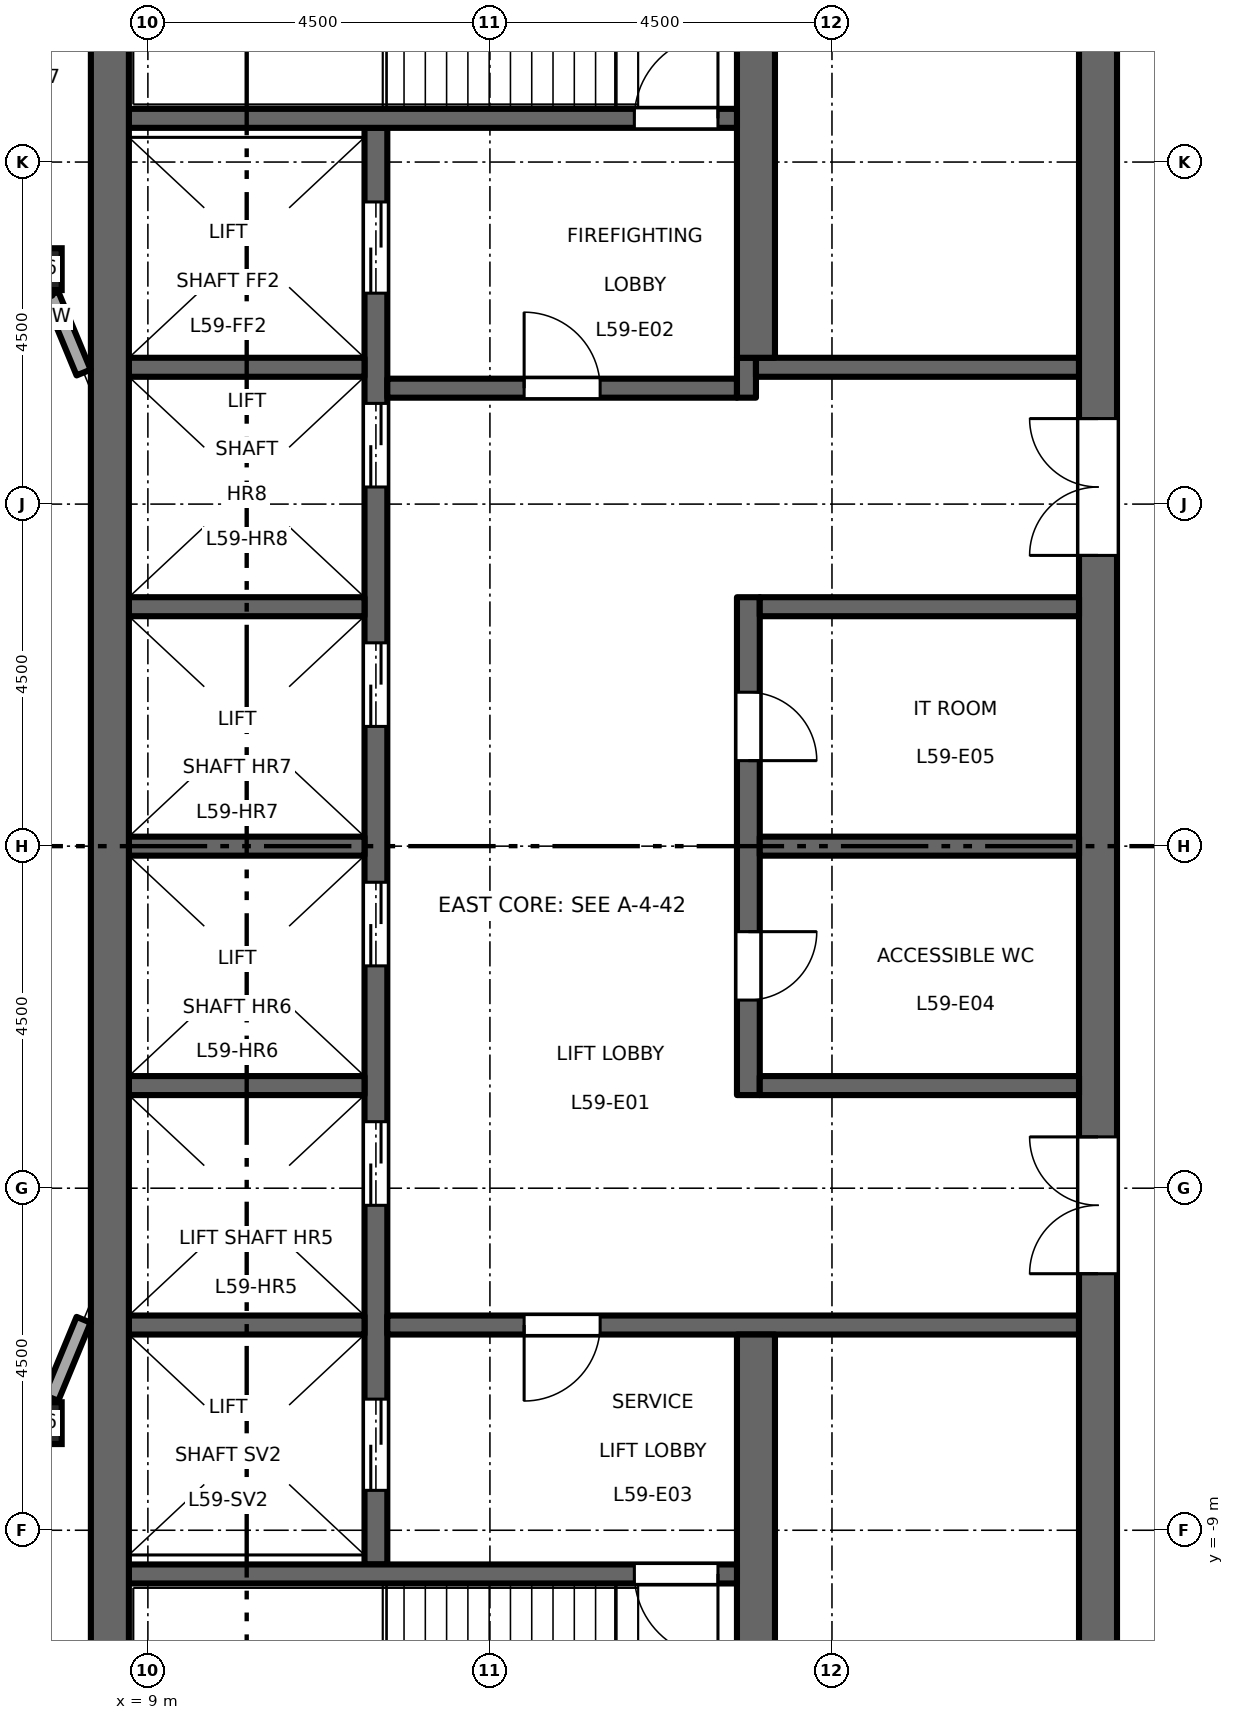
"""IFC4 building model, lengths in metres.
Left out: names, types, materials, properties, quantities, classifications, styles, units other than length and angle.
Written with IfcOpenShell. Run it as: python <this file> out.ifc"""

import sys

from ifc_helpers import new_model, si_unit, direction, frame, frame_2d, origin, origin_2d, place, context, subcontext, project, spatial, rectangle, hollow_rectangle, extrude, element, fill, save


model = new_model("IFC4")
c1 = context("Model", 3, precision=1e-05, world=origin(), true_north=direction((0.0, 1.0)))
c2 = subcontext(c1, "Body", "Model", "MODEL_VIEW")
j1 = project(units=[si_unit("LENGTHUNIT", "METRE"), si_unit("PLANEANGLEUNIT", "RADIAN")], contexts=[c1])
p1 = place(None, origin())
s1 = spatial("IfcSite", under=j1, at=p1, CompositionType="ELEMENT")
p2 = place(p1, origin())
s2 = spatial("IfcBuilding", under=s1, at=p2, CompositionType="ELEMENT")
p3 = place(p2, frame((0.0, 0.0, 273.7)))
s3 = spatial("IfcBuildingStorey", under=s2, at=p3, CompositionType="ELEMENT", Elevation=273.7)
for number, where, z_axis, x_axis in (
    (1, (7.591, -7.591, 0.0), (0.0, 0.0, 1.0), (1.0, 0.0, 0.0)),
    (2, (7.591, 7.591, 0.0), (0.0, 0.0, 1.0), (1.0, 0.0, 0.0)),
):
    element("IfcColumn", number, at=place(p3, frame(where, z_axis=z_axis, x_axis=x_axis)), inside=s3, PredefinedType="COLUMN", context=c2, shape_type="SweptSolid", body=[
        extrude(hollow_rectangle(XDim=0.55, YDim=0.55, WallThickness=0.028, at=origin_2d()), origin(), (0.0, 0.0, 1.0), 4.5),
    ])
p4 = place(p3, frame((12.0, -9.45, 0.0), z_axis=(0.0, 0.0, 1.0), x_axis=(0.0, 1.0, 0.0)))
e3 = element("IfcWall", 3, at=p4, inside=s3, PredefinedType="SHEAR", context=c2, shape_type="SweptSolid", body=[
    extrude(rectangle(XDim=18.9, YDim=0.3, at=frame_2d((9.45, 0.0))), origin(), (0.0, 0.0, 1.0), 4.3),
])
p5 = place(p4, frame((4.725, 0.0, 0.0)))
e4 = element("IfcOpeningElement", 4, at=p5, cuts=e3, PredefinedType="OPENING", context=c2, shape_type="SweptSolid", body=[
    extrude(rectangle(XDim=1.1, YDim=2.1, at=frame_2d((0.55, 1.05))), frame((0.0, 0.16, 0.0), z_axis=(0.0, -1.0, 0.0), x_axis=(1.0, 0.0, 0.0)), (0.0, 0.0, 1.0), 0.32),
])
p6 = place(p4, frame((7.875, 0.0, 0.0)))
e5 = element("IfcOpeningElement", 5, at=p6, cuts=e3, PredefinedType="OPENING", context=c2, shape_type="SweptSolid", body=[
    extrude(rectangle(XDim=1.1, YDim=2.1, at=frame_2d((0.55, 1.05))), frame((0.0, 0.16, 0.0), z_axis=(0.0, -1.0, 0.0), x_axis=(1.0, 0.0, 0.0)), (0.0, 0.0, 1.0), 0.32),
])
p7 = place(p4, frame((11.025, 0.0, 0.0)))
e6 = element("IfcOpeningElement", 6, at=p7, cuts=e3, PredefinedType="OPENING", context=c2, shape_type="SweptSolid", body=[
    extrude(rectangle(XDim=1.1, YDim=2.1, at=frame_2d((0.55, 1.05))), frame((0.0, 0.16, 0.0), z_axis=(0.0, -1.0, 0.0), x_axis=(1.0, 0.0, 0.0)), (0.0, 0.0, 1.0), 0.32),
])
p8 = place(p4, frame((14.175, 0.0, 0.0)))
e7 = element("IfcOpeningElement", 7, at=p8, cuts=e3, PredefinedType="OPENING", context=c2, shape_type="SweptSolid", body=[
    extrude(rectangle(XDim=1.1, YDim=2.1, at=frame_2d((0.55, 1.05))), frame((0.0, 0.16, 0.0), z_axis=(0.0, -1.0, 0.0), x_axis=(1.0, 0.0, 0.0)), (0.0, 0.0, 1.0), 0.32),
])
p9 = place(p4, frame((16.725, 0.0, 0.0)))
e8 = element("IfcOpeningElement", 8, at=p9, cuts=e3, PredefinedType="OPENING", context=c2, shape_type="SweptSolid", body=[
    extrude(rectangle(XDim=1.2, YDim=2.1, at=frame_2d((0.6, 1.05))), frame((0.0, 0.16, 0.0), z_axis=(0.0, -1.0, 0.0), x_axis=(1.0, 0.0, 0.0)), (0.0, 0.0, 1.0), 0.32),
])
p10 = place(p4, frame((0.975, 0.0, 0.0)))
e9 = element("IfcOpeningElement", 9, at=p10, cuts=e3, PredefinedType="OPENING", context=c2, shape_type="SweptSolid", body=[
    extrude(rectangle(XDim=1.2, YDim=2.1, at=frame_2d((0.6, 1.05))), frame((0.0, 0.16, 0.0), z_axis=(0.0, -1.0, 0.0), x_axis=(1.0, 0.0, 0.0)), (0.0, 0.0, 1.0), 0.32),
])
p11 = place(p3, frame((12.15, 6.025, 0.0), z_axis=(0.0, 0.0, 1.0), x_axis=(1.0, 0.0, 0.0)))
e10 = element("IfcWall", 10, at=p11, inside=s3, PredefinedType="SHEAR", context=c2, shape_type="SweptSolid", body=[
    extrude(rectangle(XDim=4.6, YDim=0.25, at=frame_2d((2.3, 0.0))), origin(), (0.0, 0.0, 1.0), 4.3),
])
p12 = place(p11, frame((1.8, 0.0, 0.0)))
e11 = element("IfcOpeningElement", 11, at=p12, cuts=e10, PredefinedType="OPENING", context=c2, shape_type="SweptSolid", body=[
    extrude(rectangle(XDim=1.0, YDim=2.1, at=frame_2d((0.5, 1.05))), frame((0.0, 0.135, 0.0), z_axis=(0.0, -1.0, 0.0), x_axis=(1.0, 0.0, 0.0)), (0.0, 0.0, 1.0), 0.27),
])
p13 = place(p3, frame((16.875, 5.9, 0.0), z_axis=(0.0, 0.0, 1.0), x_axis=(0.0, 1.0, 0.0)))
e12 = element("IfcWall", 12, at=p13, inside=s3, PredefinedType="SHEAR", context=c2, shape_type="SweptSolid", body=[
    extrude(rectangle(XDim=0.525, YDim=0.25, at=frame_2d((0.263, 0.0))), origin(), (0.0, 0.0, 1.0), 4.3),
])
p14 = place(p3, frame((17.0, 6.3, 0.0), z_axis=(0.0, 0.0, 1.0), x_axis=(1.0, 0.0, 0.0)))
e13 = element("IfcWall", 13, at=p14, inside=s3, PredefinedType="SHEAR", context=c2, shape_type="SweptSolid", body=[
    extrude(rectangle(XDim=4.25, YDim=0.25, at=frame_2d((2.125, 0.0))), origin(), (0.0, 0.0, 1.0), 4.3),
])
p15 = place(p3, frame((12.15, -6.3, 0.0), z_axis=(0.0, 0.0, 1.0), x_axis=(1.0, 0.0, 0.0)))
e14 = element("IfcWall", 14, at=p15, inside=s3, PredefinedType="SHEAR", context=c2, shape_type="SweptSolid", body=[
    extrude(rectangle(XDim=9.1, YDim=0.25, at=frame_2d((4.55, 0.0))), origin(), (0.0, 0.0, 1.0), 4.3),
])
p16 = place(p15, frame((1.8, 0.0, 0.0)))
e15 = element("IfcOpeningElement", 15, at=p16, cuts=e14, PredefinedType="OPENING", context=c2, shape_type="SweptSolid", body=[
    extrude(rectangle(XDim=1.0, YDim=2.1, at=frame_2d((0.5, 1.05))), frame((0.0, 0.135, 0.0), z_axis=(0.0, -1.0, 0.0), x_axis=(1.0, 0.0, 0.0)), (0.0, 0.0, 1.0), 0.27),
])
p17 = place(p3, frame((21.5, -13.0, 0.0), z_axis=(0.0, 0.0, 1.0), x_axis=(0.0, 1.0, 0.0)))
e16 = element("IfcWall", 16, at=p17, inside=s3, PredefinedType="SHEAR", context=c2, shape_type="SweptSolid", body=[
    extrude(rectangle(XDim=26.0, YDim=0.5, at=frame_2d((13.0, 0.0))), origin(), (0.0, 0.0, 1.0), 4.3),
])
p18 = place(p17, frame((16.825, 0.0, 0.0)))
e17 = element("IfcOpeningElement", 17, at=p18, cuts=e16, PredefinedType="OPENING", context=c2, shape_type="SweptSolid", body=[
    extrude(rectangle(XDim=1.8, YDim=2.1, at=frame_2d((0.9, 1.05))), frame((0.0, 0.26, 0.0), z_axis=(0.0, -1.0, 0.0), x_axis=(1.0, 0.0, 0.0)), (0.0, 0.0, 1.0), 0.52),
])
p19 = place(p17, frame((7.375, 0.0, 0.0)))
e18 = element("IfcOpeningElement", 18, at=p19, cuts=e16, PredefinedType="OPENING", context=c2, shape_type="SweptSolid", body=[
    extrude(rectangle(XDim=1.8, YDim=2.1, at=frame_2d((0.9, 1.05))), frame((0.0, 0.26, 0.0), z_axis=(0.0, -1.0, 0.0), x_axis=(1.0, 0.0, 0.0)), (0.0, 0.0, 1.0), 0.52),
])
p20 = place(p3, frame((16.9, -3.275, 0.0), z_axis=(0.0, 0.0, 1.0), x_axis=(0.0, 1.0, 0.0)))
e19 = element("IfcWall", 19, at=p20, inside=s3, PredefinedType="SHEAR", context=c2, shape_type="SweptSolid", body=[
    extrude(rectangle(XDim=6.55, YDim=0.3, at=frame_2d((3.275, 0.0))), origin(), (0.0, 0.0, 1.0), 4.3),
])
p21 = place(p20, frame((1.25, 0.0, 0.0)))
e20 = element("IfcOpeningElement", 20, at=p21, cuts=e19, PredefinedType="OPENING", context=c2, shape_type="SweptSolid", body=[
    extrude(rectangle(XDim=0.9, YDim=2.1, at=frame_2d((0.45, 1.05))), frame((0.0, 0.16, 0.0), z_axis=(0.0, -1.0, 0.0), x_axis=(1.0, 0.0, 0.0)), (0.0, 0.0, 1.0), 0.32),
])
p22 = place(p20, frame((4.4, 0.0, 0.0)))
e21 = element("IfcOpeningElement", 21, at=p22, cuts=e19, PredefinedType="OPENING", context=c2, shape_type="SweptSolid", body=[
    extrude(rectangle(XDim=0.9, YDim=2.1, at=frame_2d((0.45, 1.05))), frame((0.0, 0.16, 0.0), z_axis=(0.0, -1.0, 0.0), x_axis=(1.0, 0.0, 0.0)), (0.0, 0.0, 1.0), 0.32),
])
for number, where, z_axis, x_axis in (
    (22, (17.05, 0.0, 0.0), (0.0, 0.0, 1.0), (1.0, 0.0, 0.0)),
    (23, (17.05, 3.15, 0.0), (0.0, 0.0, 1.0), (1.0, 0.0, 0.0)),
    (24, (17.05, -3.15, 0.0), (0.0, 0.0, 1.0), (1.0, 0.0, 0.0)),
):
    element("IfcWall", number, at=place(p3, frame(where, z_axis=z_axis, x_axis=x_axis)), inside=s3, PredefinedType="SHEAR", context=c2, shape_type="SweptSolid", body=[
        extrude(rectangle(XDim=4.2, YDim=0.25, at=frame_2d((2.1, 0.0))), origin(), (0.0, 0.0, 1.0), 4.3),
    ])
for number, where, z_axis, x_axis in (
    (25, (17.0, 6.425, 0.0), (0.0, 0.0, 1.0), (0.0, 1.0, 0.0)),
    (26, (17.0, -13.0, 0.0), (0.0, 0.0, 1.0), (0.0, 1.0, 0.0)),
):
    element("IfcWall", number, at=place(p3, frame(where, z_axis=z_axis, x_axis=x_axis)), inside=s3, PredefinedType="SHEAR", context=c2, shape_type="SweptSolid", body=[
        extrude(rectangle(XDim=6.575, YDim=0.5, at=frame_2d((3.288, 0.0))), origin(), (0.0, 0.0, 1.0), 4.3),
    ])
for number, where, z_axis, x_axis in (
    (27, (8.75, 0.0, 0.0), (0.0, 0.0, 1.0), (1.0, 0.0, 0.0)),
    (28, (8.75, 3.15, 0.0), (0.0, 0.0, 1.0), (1.0, 0.0, 0.0)),
    (29, (8.75, 6.3, 0.0), (0.0, 0.0, 1.0), (1.0, 0.0, 0.0)),
    (30, (8.75, -3.15, 0.0), (0.0, 0.0, 1.0), (1.0, 0.0, 0.0)),
    (31, (8.75, -6.3, 0.0), (0.0, 0.0, 1.0), (1.0, 0.0, 0.0)),
):
    element("IfcWall", number, at=place(p3, frame(where, z_axis=z_axis, x_axis=x_axis)), inside=s3, PredefinedType="SHEAR", context=c2, shape_type="SweptSolid", body=[
        extrude(rectangle(XDim=3.1, YDim=0.25, at=frame_2d((1.55, 0.0))), origin(), (0.0, 0.0, 1.0), 4.3),
    ])
p23 = place(p3, frame((8.75, 9.575, 0.0), z_axis=(0.0, 0.0, 1.0), x_axis=(1.0, 0.0, 0.0)))
e32 = element("IfcWall", 32, at=p23, inside=s3, PredefinedType="SHEAR", context=c2, shape_type="SweptSolid", body=[
    extrude(rectangle(XDim=8.0, YDim=0.25, at=frame_2d((4.0, 0.0))), origin(), (0.0, 0.0, 1.0), 4.3),
])
p24 = place(p23, frame((6.65, 0.0, 0.0)))
e33 = element("IfcOpeningElement", 33, at=p24, cuts=e32, PredefinedType="OPENING", context=c2, shape_type="SweptSolid", body=[
    extrude(rectangle(XDim=1.1, YDim=2.1, at=frame_2d((0.55, 1.05))), frame((0.0, 0.135, 0.0), z_axis=(0.0, -1.0, 0.0), x_axis=(1.0, 0.0, 0.0)), (0.0, 0.0, 1.0), 0.27),
])
p25 = place(p3, frame((8.75, -9.575, 0.0), z_axis=(0.0, 0.0, 1.0), x_axis=(1.0, 0.0, 0.0)))
e34 = element("IfcWall", 34, at=p25, inside=s3, PredefinedType="SHEAR", context=c2, shape_type="SweptSolid", body=[
    extrude(rectangle(XDim=8.0, YDim=0.25, at=frame_2d((4.0, 0.0))), origin(), (0.0, 0.0, 1.0), 4.3),
])
p26 = place(p25, frame((6.65, 0.0, 0.0)))
e35 = element("IfcOpeningElement", 35, at=p26, cuts=e34, PredefinedType="OPENING", context=c2, shape_type="SweptSolid", body=[
    extrude(rectangle(XDim=1.1, YDim=2.1, at=frame_2d((0.55, 1.05))), frame((0.0, 0.135, 0.0), z_axis=(0.0, -1.0, 0.0), x_axis=(1.0, 0.0, 0.0)), (0.0, 0.0, 1.0), 0.27),
])
p27 = place(p3, frame((8.5, -13.0, 0.0), z_axis=(0.0, 0.0, 1.0), x_axis=(0.0, 1.0, 0.0)))
e36 = element("IfcWall", 36, at=p27, inside=s3, PredefinedType="SHEAR", context=c2, shape_type="SweptSolid", body=[
    extrude(rectangle(XDim=26.0, YDim=0.5, at=frame_2d((13.0, 0.0))), origin(), (0.0, 0.0, 1.0), 4.3),
])
for number, where, z_axis, x_axis in (
    (37, (7.729, -7.259, 0.0), (0.0, 0.0, 1.0), (0.383, 0.924, 0.0)),
    (38, (8.154, 6.231, 0.0), (0.0, 0.0, 1.0), (-0.383, 0.924, 0.0)),
):
    element("IfcWall", number, at=place(p3, frame(where, z_axis=z_axis, x_axis=x_axis)), inside=s3, PredefinedType="STANDARD", context=c2, shape_type="SweptSolid", body=[
        extrude(rectangle(XDim=1.113, YDim=0.2, at=frame_2d((0.556, 0.0))), origin(), (0.0, 0.0, 1.0), 3.868),
    ])
p28 = place(p12, origin())
e39 = element("IfcDoor", 39, at=p28, inside=s3, OperationType="SINGLE_SWING_RIGHT", PredefinedType="DOOR", context=c2, shape_type="SweptSolid", body=[
    extrude(rectangle(XDim=1.0, YDim=2.1, at=frame_2d((0.5, 1.05))), frame((0.0, 0.025, 0.0), z_axis=(0.0, -1.0, 0.0), x_axis=(1.0, 0.0, 0.0)), (0.0, 0.0, 1.0), 0.05),
])
fill(e11, e39)
p29 = place(p16, origin())
e40 = element("IfcDoor", 40, at=p29, inside=s3, OperationType="SINGLE_SWING_LEFT", PredefinedType="DOOR", context=c2, shape_type="SweptSolid", body=[
    extrude(rectangle(XDim=1.0, YDim=2.1, at=frame_2d((0.5, 1.05))), frame((0.0, 0.025, 0.0), z_axis=(0.0, -1.0, 0.0), x_axis=(1.0, 0.0, 0.0)), (0.0, 0.0, 1.0), 0.05),
])
fill(e15, e40)
p30 = place(p24, origin())
e41 = element("IfcDoor", 41, at=p30, inside=s3, OperationType="SINGLE_SWING_LEFT", PredefinedType="DOOR", context=c2, shape_type="SweptSolid", body=[
    extrude(rectangle(XDim=1.1, YDim=2.1, at=frame_2d((0.55, 1.05))), frame((0.0, 0.025, 0.0), z_axis=(0.0, -1.0, 0.0), x_axis=(1.0, 0.0, 0.0)), (0.0, 0.0, 1.0), 0.05),
])
fill(e33, e41)
p31 = place(p26, origin())
e42 = element("IfcDoor", 42, at=p31, inside=s3, OperationType="SINGLE_SWING_RIGHT", PredefinedType="DOOR", context=c2, shape_type="SweptSolid", body=[
    extrude(rectangle(XDim=1.1, YDim=2.1, at=frame_2d((0.55, 1.05))), frame((0.0, 0.025, 0.0), z_axis=(0.0, -1.0, 0.0), x_axis=(1.0, 0.0, 0.0)), (0.0, 0.0, 1.0), 0.05),
])
fill(e35, e42)
p32 = place(p18, origin())
e43 = element("IfcDoor", 43, at=p32, inside=s3, OperationType="DOUBLE_DOOR_DOUBLE_SWING", PredefinedType="DOOR", context=c2, shape_type="SweptSolid", body=[
    extrude(rectangle(XDim=1.8, YDim=2.1, at=frame_2d((0.9, 1.05))), frame((0.0, 0.025, 0.0), z_axis=(0.0, -1.0, 0.0), x_axis=(1.0, 0.0, 0.0)), (0.0, 0.0, 1.0), 0.05),
])
fill(e17, e43)
p33 = place(p19, origin())
e44 = element("IfcDoor", 44, at=p33, inside=s3, OperationType="DOUBLE_DOOR_DOUBLE_SWING", PredefinedType="DOOR", context=c2, shape_type="SweptSolid", body=[
    extrude(rectangle(XDim=1.8, YDim=2.1, at=frame_2d((0.9, 1.05))), frame((0.0, 0.025, 0.0), z_axis=(0.0, -1.0, 0.0), x_axis=(1.0, 0.0, 0.0)), (0.0, 0.0, 1.0), 0.05),
])
fill(e18, e44)
p34 = place(p5, origin())
e45 = element("IfcDoor", 45, at=p34, inside=s3, OperationType="DOUBLE_DOOR_SLIDING", PredefinedType="DOOR", context=c2, shape_type="SweptSolid", body=[
    extrude(rectangle(XDim=1.1, YDim=2.1, at=frame_2d((0.55, 1.05))), frame((0.0, 0.025, 0.0), z_axis=(0.0, -1.0, 0.0), x_axis=(1.0, 0.0, 0.0)), (0.0, 0.0, 1.0), 0.05),
])
fill(e4, e45)
p35 = place(p6, origin())
e46 = element("IfcDoor", 46, at=p35, inside=s3, OperationType="DOUBLE_DOOR_SLIDING", PredefinedType="DOOR", context=c2, shape_type="SweptSolid", body=[
    extrude(rectangle(XDim=1.1, YDim=2.1, at=frame_2d((0.55, 1.05))), frame((0.0, 0.025, 0.0), z_axis=(0.0, -1.0, 0.0), x_axis=(1.0, 0.0, 0.0)), (0.0, 0.0, 1.0), 0.05),
])
fill(e5, e46)
p36 = place(p7, origin())
e47 = element("IfcDoor", 47, at=p36, inside=s3, OperationType="DOUBLE_DOOR_SLIDING", PredefinedType="DOOR", context=c2, shape_type="SweptSolid", body=[
    extrude(rectangle(XDim=1.1, YDim=2.1, at=frame_2d((0.55, 1.05))), frame((0.0, 0.025, 0.0), z_axis=(0.0, -1.0, 0.0), x_axis=(1.0, 0.0, 0.0)), (0.0, 0.0, 1.0), 0.05),
])
fill(e6, e47)
p37 = place(p8, origin())
e48 = element("IfcDoor", 48, at=p37, inside=s3, OperationType="DOUBLE_DOOR_SLIDING", PredefinedType="DOOR", context=c2, shape_type="SweptSolid", body=[
    extrude(rectangle(XDim=1.1, YDim=2.1, at=frame_2d((0.55, 1.05))), frame((0.0, 0.025, 0.0), z_axis=(0.0, -1.0, 0.0), x_axis=(1.0, 0.0, 0.0)), (0.0, 0.0, 1.0), 0.05),
])
fill(e7, e48)
p38 = place(p9, origin())
e49 = element("IfcDoor", 49, at=p38, inside=s3, OperationType="DOUBLE_DOOR_SLIDING", PredefinedType="DOOR", context=c2, shape_type="SweptSolid", body=[
    extrude(rectangle(XDim=1.2, YDim=2.1, at=frame_2d((0.6, 1.05))), frame((0.0, 0.025, 0.0), z_axis=(0.0, -1.0, 0.0), x_axis=(1.0, 0.0, 0.0)), (0.0, 0.0, 1.0), 0.05),
])
fill(e8, e49)
p39 = place(p10, origin())
e50 = element("IfcDoor", 50, at=p39, inside=s3, OperationType="DOUBLE_DOOR_SLIDING", PredefinedType="DOOR", context=c2, shape_type="SweptSolid", body=[
    extrude(rectangle(XDim=1.2, YDim=2.1, at=frame_2d((0.6, 1.05))), frame((0.0, 0.025, 0.0), z_axis=(0.0, -1.0, 0.0), x_axis=(1.0, 0.0, 0.0)), (0.0, 0.0, 1.0), 0.05),
])
fill(e9, e50)
p40 = place(p21, origin())
e51 = element("IfcDoor", 51, at=p40, inside=s3, OperationType="SINGLE_SWING_RIGHT", PredefinedType="DOOR", context=c2, shape_type="SweptSolid", body=[
    extrude(rectangle(XDim=0.9, YDim=2.1, at=frame_2d((0.45, 1.05))), frame((0.0, 0.025, 0.0), z_axis=(0.0, -1.0, 0.0), x_axis=(1.0, 0.0, 0.0)), (0.0, 0.0, 1.0), 0.05),
])
fill(e20, e51)
p41 = place(p22, origin())
e52 = element("IfcDoor", 52, at=p41, inside=s3, OperationType="SINGLE_SWING_LEFT", PredefinedType="DOOR", context=c2, shape_type="SweptSolid", body=[
    extrude(rectangle(XDim=0.9, YDim=2.1, at=frame_2d((0.45, 1.05))), frame((0.0, 0.025, 0.0), z_axis=(0.0, -1.0, 0.0), x_axis=(1.0, 0.0, 0.0)), (0.0, 0.0, 1.0), 0.05),
])
fill(e21, e52)
save(model, sys.argv[1])
